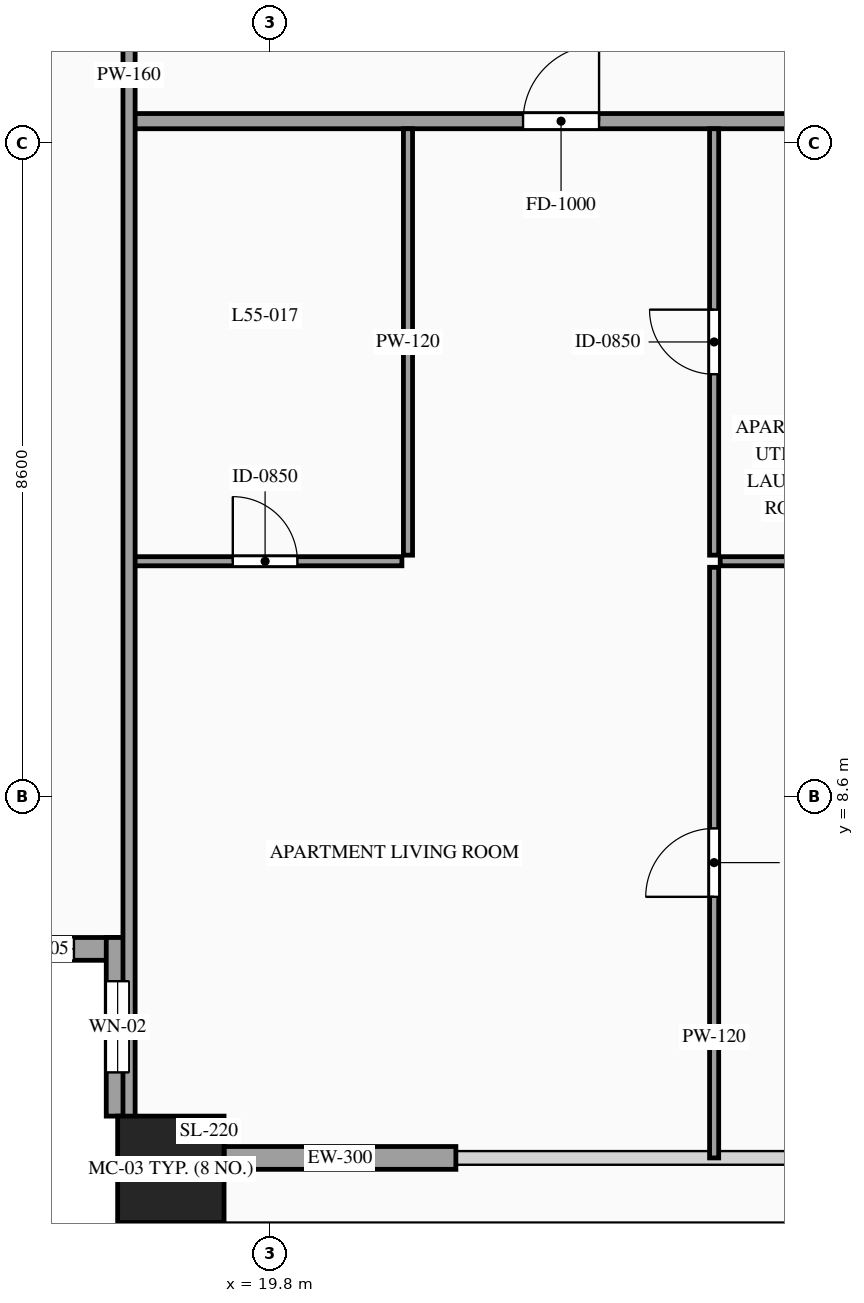
"""IFC4 building model, lengths in metres.
Left out: names, types, materials, properties, quantities, classifications, styles, units other than length and angle.
Written with IfcOpenShell. Run it as: python <this file> out.ifc"""

import sys

from ifc_helpers import new_model, si_unit, direction, frame, frame_2d, origin, origin_2d, place, context, subcontext, project, spatial, rectangle, hollow_rectangle, extrude, source, transform, mapped, element, fill, save


model = new_model("IFC4")
c1 = context("Model", 3, precision=1e-05, world=origin(), true_north=direction((0.0, 1.0)))
c2 = subcontext(c1, "Body", "Model", "MODEL_VIEW")
j1 = project(units=[si_unit("LENGTHUNIT", "METRE"), si_unit("PLANEANGLEUNIT", "RADIAN")], contexts=[c1])
p1 = place(None, origin())
s1 = spatial("IfcSite", under=j1, at=p1, CompositionType="ELEMENT")
p2 = place(p1, origin())
s2 = spatial("IfcBuilding", under=s1, at=p2, CompositionType="ELEMENT")
p3 = place(p2, frame((0.0, 0.0, 209.0)))
s3 = spatial("IfcBuildingStorey", under=s2, at=p3, CompositionType="ELEMENT", Elevation=209.0)
m1 = source(origin(), c2, "Body", "SweptSolid", [
    extrude(hollow_rectangle(XDim=1.4, YDim=1.4, WallThickness=0.06, at=origin_2d()), origin(), (0.0, 0.0, 1.0), 3.5),
])
p4 = place(p3, frame((18.5, 3.7, 0.0), z_axis=(0.0, 0.0, 1.0), x_axis=(1.0, 0.0, 0.0)))
e1 = element("IfcColumn", 1, at=p4, inside=s3, PredefinedType="COLUMN", context=c2, shape_type="MappedRepresentation", body=[
    mapped(m1, transform((0.0, 0.0, 0.0), scale=1.0)),
])
p5 = place(p3, frame((15.6, 6.6, 0.0), z_axis=(0.0, 0.0, 1.0), x_axis=(1.0, 0.0, 0.0)))
e2 = element("IfcWall", 2, at=p5, inside=s3, PredefinedType="SOLIDWALL", context=c2, shape_type="SweptSolid", body=[
    extrude(rectangle(XDim=2.35, YDim=0.3, at=frame_2d((1.175, 0.0))), origin(), (0.0, 0.0, 1.0), 3.28),
])
p6 = place(p5, frame((0.725, 0.0, 0.85)))
e3 = element("IfcOpeningElement", 3, at=p6, cuts=e2, PredefinedType="OPENING", context=c2, shape_type="SweptSolid", body=[
    extrude(rectangle(XDim=0.9, YDim=1.5, at=frame_2d((0.45, 0.75))), frame((0.0, 0.165, 0.0), z_axis=(0.0, -1.0, 0.0), x_axis=(1.0, 0.0, 0.0)), (0.0, 0.0, 1.0), 0.33),
])
p7 = place(p3, frame((17.8, 6.75, 0.0), z_axis=(0.0, 0.0, 1.0), x_axis=(0.0, -1.0, 0.0)))
e4 = element("IfcWall", 4, at=p7, inside=s3, PredefinedType="SOLIDWALL", context=c2, shape_type="SweptSolid", body=[
    extrude(rectangle(XDim=2.35, YDim=0.3, at=frame_2d((1.175, 0.0))), origin(), (0.0, 0.0, 1.0), 3.28),
])
p8 = place(p7, frame((0.575, 0.0, 0.85)))
e5 = element("IfcOpeningElement", 5, at=p8, cuts=e4, PredefinedType="OPENING", context=c2, shape_type="SweptSolid", body=[
    extrude(rectangle(XDim=1.2, YDim=2.1, at=frame_2d((0.6, 1.05))), frame((0.0, 0.165, 0.0), z_axis=(0.0, -1.0, 0.0), x_axis=(1.0, 0.0, 0.0)), (0.0, 0.0, 1.0), 0.33),
])
m2 = source(origin(), c2, "Body", "SweptSolid", [
    extrude(rectangle(XDim=3.05, YDim=0.3, at=frame_2d((1.525, 0.0))), origin(), (0.0, 0.0, 1.0), 2.835),
])
p9 = place(p3, frame((19.2, 3.85, 0.0), z_axis=(0.0, 0.0, 1.0), x_axis=(1.0, 0.0, 0.0)))
e6 = element("IfcWall", 6, at=p9, inside=s3, PredefinedType="SOLIDWALL", context=c2, shape_type="MappedRepresentation", body=[
    mapped(m2, transform((0.0, 0.0, 0.0), scale=1.0)),
])
p10 = place(p3, frame((17.94, 17.49, 0.0), z_axis=(0.0, 0.0, 1.0), x_axis=(1.0, 0.0, 0.0)))
e7 = element("IfcWall", 7, at=p10, inside=s3, PredefinedType="PARTITIONING", context=c2, shape_type="SweptSolid", body=[
    extrude(rectangle(XDim=12.5, YDim=0.2, at=frame_2d((6.25, 0.0))), origin(), (0.0, 0.0, 1.0), 3.28),
])
p11 = place(p10, frame((5.194, 0.0, 0.0)))
e8 = element("IfcOpeningElement", 8, at=p11, cuts=e7, PredefinedType="OPENING", context=c2, shape_type="SweptSolid", body=[
    extrude(rectangle(XDim=1.0, YDim=2.2, at=frame_2d((0.5, 1.1))), frame((0.0, 0.115, 0.0), z_axis=(0.0, -1.0, 0.0), x_axis=(1.0, 0.0, 0.0)), (0.0, 0.0, 1.0), 0.23),
])
p12 = place(p3, frame((17.94, 11.7, 0.0), z_axis=(0.0, 0.0, 1.0), x_axis=(1.0, 0.0, 0.0)))
e9 = element("IfcWall", 9, at=p12, inside=s3, PredefinedType="PARTITIONING", context=c2, shape_type="SweptSolid", body=[
    extrude(rectangle(XDim=3.6, YDim=0.12, at=frame_2d((1.8, 0.0))), origin(), (0.0, 0.0, 1.0), 3.28),
])
p13 = place(p12, frame((1.375, 0.0, 0.0)))
e10 = element("IfcOpeningElement", 10, at=p13, cuts=e9, PredefinedType="OPENING", context=c2, shape_type="SweptSolid", body=[
    extrude(rectangle(XDim=0.85, YDim=2.1, at=frame_2d((0.425, 1.05))), frame((0.0, 0.075, 0.0), z_axis=(0.0, -1.0, 0.0), x_axis=(1.0, 0.0, 0.0)), (0.0, 0.0, 1.0), 0.15),
])
m3 = source(origin(), c2, "Body", "SweptSolid", [
    extrude(rectangle(XDim=5.61, YDim=0.12, at=frame_2d((2.805, 0.0))), origin(), (0.0, 0.0, 1.0), 3.28),
])
p14 = place(p3, frame((21.62, 11.78, 0.0), z_axis=(0.0, 0.0, 1.0), x_axis=(0.0, 1.0, 0.0)))
e11 = element("IfcWall", 11, at=p14, inside=s3, PredefinedType="PARTITIONING", context=c2, shape_type="MappedRepresentation", body=[
    mapped(m3, transform((0.0, 0.0, 0.0), scale=1.0)),
])
m4 = source(origin(), c2, "Body", "SweptSolid", [
    extrude(rectangle(XDim=4.712, YDim=0.12, at=frame_2d((2.356, 0.0))), origin(), (0.0, 0.0, 1.0), 2.875),
])
p15 = place(p3, frame((25.728, 11.7, 0.0), z_axis=(0.0, 0.0, 1.0), x_axis=(1.0, 0.0, 0.0)))
e12 = element("IfcWall", 12, at=p15, inside=s3, PredefinedType="PARTITIONING", context=c2, shape_type="MappedRepresentation", body=[
    mapped(m4, transform((0.0, 0.0, 0.0), scale=1.0)),
])
p16 = place(p3, frame((25.648, 3.85, 0.0), z_axis=(0.0, 0.0, 1.0), x_axis=(0.0, 1.0, 0.0)))
e13 = element("IfcWall", 13, at=p16, inside=s3, PredefinedType="PARTITIONING", context=c2, shape_type="SweptSolid", body=[
    extrude(rectangle(XDim=7.77, YDim=0.12, at=frame_2d((3.885, 0.0))), origin(), (0.0, 0.0, 1.0), 3.28),
])
p17 = place(p16, frame((3.435, 0.0, 0.0)))
e14 = element("IfcOpeningElement", 14, at=p17, cuts=e13, PredefinedType="OPENING", context=c2, shape_type="SweptSolid", body=[
    extrude(rectangle(XDim=0.9, YDim=2.15, at=frame_2d((0.45, 1.075))), frame((0.0, 0.075, 0.0), z_axis=(0.0, -1.0, 0.0), x_axis=(1.0, 0.0, 0.0)), (0.0, 0.0, 1.0), 0.15),
])
p18 = place(p3, frame((25.648, 11.78, 0.0), z_axis=(0.0, 0.0, 1.0), x_axis=(0.0, 1.0, 0.0)))
e15 = element("IfcWall", 15, at=p18, inside=s3, PredefinedType="PARTITIONING", context=c2, shape_type="SweptSolid", body=[
    extrude(rectangle(XDim=5.61, YDim=0.12, at=frame_2d((2.805, 0.0))), origin(), (0.0, 0.0, 1.0), 3.28),
])
p19 = place(p18, frame((2.38, 0.0, 0.0)))
e16 = element("IfcOpeningElement", 16, at=p19, cuts=e15, PredefinedType="OPENING", context=c2, shape_type="SweptSolid", body=[
    extrude(rectangle(XDim=0.85, YDim=2.1, at=frame_2d((0.425, 1.05))), frame((0.0, 0.075, 0.0), z_axis=(0.0, -1.0, 0.0), x_axis=(1.0, 0.0, 0.0)), (0.0, 0.0, 1.0), 0.15),
])
m5 = source(origin(), c2, "Body", "SweptSolid", [
    extrude(rectangle(XDim=28.19, YDim=0.16, at=frame_2d((14.095, 0.0))), origin(), (0.0, 0.0, 1.0), 3.28),
])
p20 = place(p3, frame((17.95, 4.0, 0.0), z_axis=(0.0, 0.0, 1.0), x_axis=(0.0, 1.0, 0.0)))
e17 = element("IfcWall", 17, at=p20, inside=s3, PredefinedType="PARTITIONING", context=c2, shape_type="MappedRepresentation", body=[
    mapped(m5, transform((0.0, 0.0, 0.0), scale=1.0)),
])
m6 = source(origin(), c2, "Body", "SweptSolid", [
    extrude(rectangle(XDim=0.9, YDim=1.5, at=frame_2d((0.45, 0.75))), frame((0.0, 0.03, 0.0), z_axis=(0.0, -1.0, 0.0), x_axis=(1.0, 0.0, 0.0)), (0.0, 0.0, 1.0), 0.06),
])
p21 = place(p6, origin())
e18 = element("IfcWindow", 18, at=p21, inside=s3, PartitioningType="SINGLE_PANEL", PredefinedType="WINDOW", context=c2, shape_type="MappedRepresentation", body=[
    mapped(m6, transform((0.0, 0.0, 0.0), scale=1.0)),
])
fill(e3, e18)
m7 = source(origin(), c2, "Body", "SweptSolid", [
    extrude(rectangle(XDim=1.2, YDim=2.1, at=frame_2d((0.6, 1.05))), frame((0.0, 0.03, 0.0), z_axis=(0.0, -1.0, 0.0), x_axis=(1.0, 0.0, 0.0)), (0.0, 0.0, 1.0), 0.06),
])
p22 = place(p8, origin())
e19 = element("IfcWindow", 19, at=p22, inside=s3, PartitioningType="SINGLE_PANEL", PredefinedType="WINDOW", context=c2, shape_type="MappedRepresentation", body=[
    mapped(m7, transform((0.0, 0.0, 0.0), scale=1.0)),
])
fill(e5, e19)
m8 = source(origin(), c2, "Body", "SweptSolid", [
    extrude(rectangle(XDim=1.0, YDim=2.2, at=frame_2d((0.5, 1.1))), frame((0.0, 0.025, 0.0), z_axis=(0.0, -1.0, 0.0), x_axis=(1.0, 0.0, 0.0)), (0.0, 0.0, 1.0), 0.05),
])
p23 = place(p11, origin())
e20 = element("IfcDoor", 20, at=p23, inside=s3, OperationType="SINGLE_SWING_RIGHT", PredefinedType="DOOR", context=c2, shape_type="MappedRepresentation", body=[
    mapped(m8, transform((0.0, 0.0, 0.0), scale=1.0)),
])
fill(e8, e20)
m9 = source(origin(), c2, "Body", "SweptSolid", [
    extrude(rectangle(XDim=0.85, YDim=2.1, at=frame_2d((0.425, 1.05))), frame((0.0, 0.025, 0.0), z_axis=(0.0, -1.0, 0.0), x_axis=(1.0, 0.0, 0.0)), (0.0, 0.0, 1.0), 0.05),
])
p24 = place(p13, origin())
e21 = element("IfcDoor", 21, at=p24, inside=s3, OperationType="SINGLE_SWING_LEFT", PredefinedType="DOOR", context=c2, shape_type="MappedRepresentation", body=[
    mapped(m9, transform((0.0, 0.0, 0.0), scale=1.0)),
])
fill(e10, e21)
m10 = source(origin(), c2, "Body", "SweptSolid", [
    extrude(rectangle(XDim=0.9, YDim=2.15, at=frame_2d((0.45, 1.075))), frame((0.0, 0.025, 0.0), z_axis=(0.0, -1.0, 0.0), x_axis=(1.0, 0.0, 0.0)), (0.0, 0.0, 1.0), 0.05),
])
p25 = place(p17, origin())
e22 = element("IfcDoor", 22, at=p25, inside=s3, OperationType="SINGLE_SWING_LEFT", PredefinedType="DOOR", context=c2, shape_type="MappedRepresentation", body=[
    mapped(m10, transform((0.0, 0.0, 0.0), scale=1.0)),
])
fill(e14, e22)
p26 = place(p19, origin())
e23 = element("IfcDoor", 23, at=p26, inside=s3, OperationType="SINGLE_SWING_RIGHT", PredefinedType="DOOR", context=c2, shape_type="MappedRepresentation", body=[
    mapped(m9, transform((0.0, 0.0, 0.0), scale=1.0)),
])
fill(e16, e23)
save(model, sys.argv[1])
